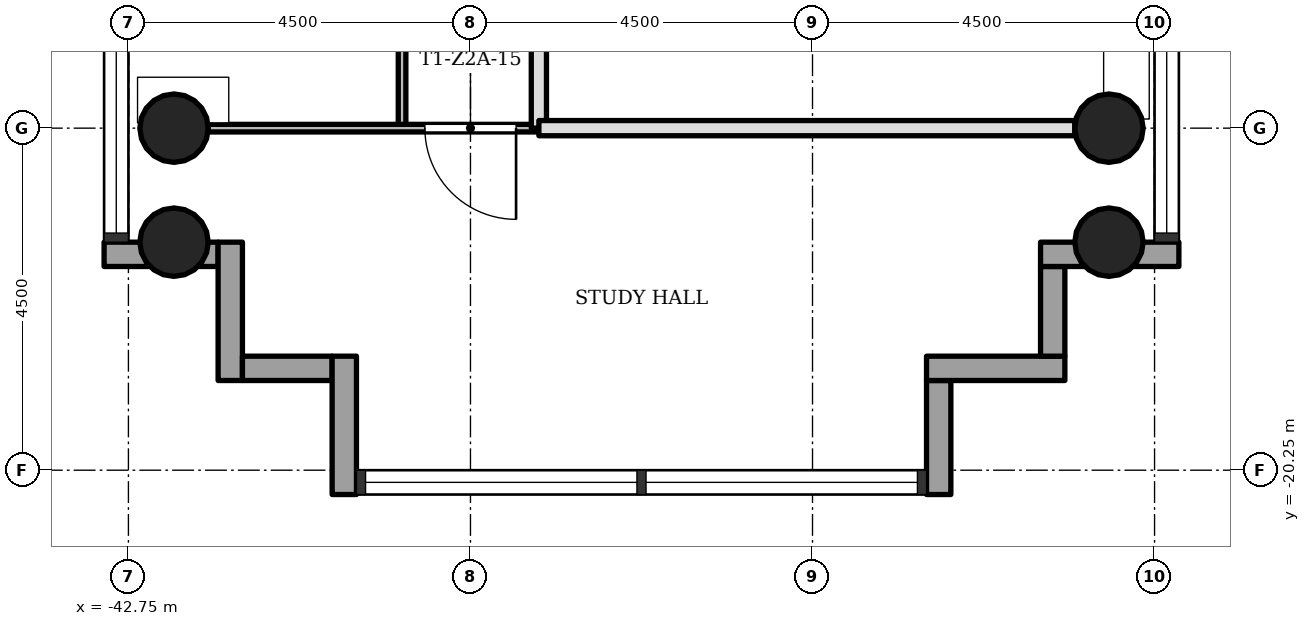
"""IFC4 building model, lengths in metres.
Left out: names, types, materials, properties, quantities, classifications, styles, units other than length and angle.
Written with IfcOpenShell. Run it as: python <this file> out.ifc"""

import sys

from ifc_helpers import new_model, si_unit, direction, frame, frame_2d, origin, origin_2d, place, context, subcontext, project, spatial, rectangle, hollow_circle, extrude, element, fill, save


model = new_model("IFC4")
c1 = context("Model", 3, precision=1e-05, world=origin(), true_north=direction((0.0, 1.0)))
c2 = subcontext(c1, "Body", "Model", "MODEL_VIEW")
j1 = project(units=[si_unit("LENGTHUNIT", "METRE"), si_unit("PLANEANGLEUNIT", "RADIAN")], contexts=[c1])
p1 = place(None, origin())
s1 = spatial("IfcSite", under=j1, at=p1, CompositionType="ELEMENT")
p2 = place(p1, origin())
s2 = spatial("IfcBuilding", under=s1, at=p2, CompositionType="ELEMENT")
p3 = place(p2, frame((0.0, 0.0, 117.4)))
s3 = spatial("IfcBuildingStorey", under=s2, at=p3, CompositionType="ELEMENT", Elevation=117.4)
for number, where, z_axis, x_axis in (
    (1, (-42.15, -15.75, 0.0), (0.0, 0.0, 1.0), (1.0, 0.0, 0.0)),
    (2, (-29.85, -15.75, 0.0), (0.0, 0.0, 1.0), (1.0, 0.0, 0.0)),
    (3, (-42.15, -17.25, 0.0), (0.0, 0.0, 1.0), (1.0, 0.0, 0.0)),
    (4, (-29.85, -17.25, 0.0), (0.0, 0.0, 1.0), (1.0, 0.0, 0.0)),
):
    element("IfcColumn", number, at=place(p3, frame(where, z_axis=z_axis, x_axis=x_axis)), inside=s3, PredefinedType="COLUMN", context=c2, shape_type="SweptSolid", body=[
        extrude(hollow_circle(Radius=0.45, WallThickness=0.032, at=origin_2d()), origin(), (0.0, 0.0, 1.0), 3.4),
    ])
p4 = place(p3, frame((-43.07, -17.41, -0.3), z_axis=(0.0, 0.0, 1.0), x_axis=(1.0, 0.0, 0.0)))
e5 = element("IfcWall", 5, at=p4, inside=s3, PredefinedType="STANDARD", context=c2, shape_type="SweptSolid", body=[
    extrude(rectangle(XDim=1.5, YDim=0.32, at=frame_2d((0.75, 0.0))), origin(), (0.0, 0.0, 1.0), 3.4),
])
p5 = place(p3, frame((-41.41, -17.25, -0.3), z_axis=(0.0, 0.0, 1.0), x_axis=(0.0, -1.0, 0.0)))
e6 = element("IfcWall", 6, at=p5, inside=s3, PredefinedType="STANDARD", context=c2, shape_type="SweptSolid", body=[
    extrude(rectangle(XDim=1.82, YDim=0.32, at=frame_2d((0.91, 0.0))), origin(), (0.0, 0.0, 1.0), 3.4),
])
p6 = place(p3, frame((-41.25, -18.91, -0.3), z_axis=(0.0, 0.0, 1.0), x_axis=(1.0, 0.0, 0.0)))
e7 = element("IfcWall", 7, at=p6, inside=s3, PredefinedType="STANDARD", context=c2, shape_type="SweptSolid", body=[
    extrude(rectangle(XDim=1.18, YDim=0.32, at=frame_2d((0.59, 0.0))), origin(), (0.0, 0.0, 1.0), 3.4),
])
p7 = place(p3, frame((-39.91, -18.75, -0.3), z_axis=(0.0, 0.0, 1.0), x_axis=(0.0, -1.0, 0.0)))
e8 = element("IfcWall", 8, at=p7, inside=s3, PredefinedType="STANDARD", context=c2, shape_type="SweptSolid", body=[
    extrude(rectangle(XDim=1.82, YDim=0.32, at=frame_2d((0.91, 0.0))), origin(), (0.0, 0.0, 1.0), 3.4),
])
p8 = place(p3, frame((-32.09, -20.57, -0.3), z_axis=(0.0, 0.0, 1.0), x_axis=(0.0, 1.0, 0.0)))
e9 = element("IfcWall", 9, at=p8, inside=s3, PredefinedType="STANDARD", context=c2, shape_type="SweptSolid", body=[
    extrude(rectangle(XDim=1.5, YDim=0.32, at=frame_2d((0.75, 0.0))), origin(), (0.0, 0.0, 1.0), 3.4),
])
p9 = place(p3, frame((-32.25, -18.91, -0.3), z_axis=(0.0, 0.0, 1.0), x_axis=(1.0, 0.0, 0.0)))
e10 = element("IfcWall", 10, at=p9, inside=s3, PredefinedType="STANDARD", context=c2, shape_type="SweptSolid", body=[
    extrude(rectangle(XDim=1.82, YDim=0.32, at=frame_2d((0.91, 0.0))), origin(), (0.0, 0.0, 1.0), 3.4),
])
p10 = place(p3, frame((-30.59, -18.75, -0.3), z_axis=(0.0, 0.0, 1.0), x_axis=(0.0, 1.0, 0.0)))
e11 = element("IfcWall", 11, at=p10, inside=s3, PredefinedType="STANDARD", context=c2, shape_type="SweptSolid", body=[
    extrude(rectangle(XDim=1.18, YDim=0.32, at=frame_2d((0.59, 0.0))), origin(), (0.0, 0.0, 1.0), 3.4),
])
p11 = place(p3, frame((-30.75, -17.41, -0.3), z_axis=(0.0, 0.0, 1.0), x_axis=(1.0, 0.0, 0.0)))
e12 = element("IfcWall", 12, at=p11, inside=s3, PredefinedType="STANDARD", context=c2, shape_type="SweptSolid", body=[
    extrude(rectangle(XDim=1.82, YDim=0.32, at=frame_2d((0.91, 0.0))), origin(), (0.0, 0.0, 1.0), 3.4),
])
p12 = place(p3, frame((-39.15, -15.75, 0.0), z_axis=(0.0, 0.0, 1.0), x_axis=(0.0, 1.0, 0.0)))
e13 = element("IfcWall", 13, at=p12, inside=s3, PredefinedType="PARTITIONING", context=c2, shape_type="SweptSolid", body=[
    extrude(rectangle(XDim=9.0, YDim=0.1, at=frame_2d((4.5, 0.0))), origin(), (0.0, 0.0, 1.0), 3.0),
])
p13 = place(p12, frame((5.55, 0.0, 0.0)))
e14 = element("IfcOpeningElement", 14, at=p13, cuts=e13, PredefinedType="OPENING", context=c2, shape_type="SweptSolid", body=[
    extrude(rectangle(XDim=0.9, YDim=2.1, at=frame_2d((0.45, 1.05))), frame((0.0, 0.06, 0.0), z_axis=(0.0, -1.0, 0.0), x_axis=(1.0, 0.0, 0.0)), (0.0, 0.0, 1.0), 0.12),
])
p14 = place(p3, frame((-37.35, -15.75, 0.0), z_axis=(0.0, 0.0, 1.0), x_axis=(0.0, 1.0, 0.0)))
e15 = element("IfcWall", 15, at=p14, inside=s3, PredefinedType="SOLIDWALL", context=c2, shape_type="SweptSolid", body=[
    extrude(rectangle(XDim=7.2, YDim=0.2, at=frame_2d((3.6, 0.0))), origin(), (0.0, 0.0, 1.0), 3.0),
])
p15 = place(p14, frame((1.95, 0.0, 0.0)))
e16 = element("IfcOpeningElement", 16, at=p15, cuts=e15, PredefinedType="OPENING", context=c2, shape_type="SweptSolid", body=[
    extrude(rectangle(XDim=0.9, YDim=2.1, at=frame_2d((0.45, 1.05))), frame((0.0, 0.11, 0.0), z_axis=(0.0, -1.0, 0.0), x_axis=(1.0, 0.0, 0.0)), (0.0, 0.0, 1.0), 0.22),
])
p16 = place(p3, frame((-41.7, -15.75, 0.0), z_axis=(0.0, 0.0, 1.0), x_axis=(1.0, 0.0, 0.0)))
e17 = element("IfcWall", 17, at=p16, inside=s3, PredefinedType="PARTITIONING", context=c2, shape_type="SweptSolid", body=[
    extrude(rectangle(XDim=4.35, YDim=0.1, at=frame_2d((2.175, 0.0))), origin(), (0.0, 0.0, 1.0), 3.0),
])
p17 = place(p16, frame((2.85, 0.0, 0.0)))
e18 = element("IfcOpeningElement", 18, at=p17, cuts=e17, PredefinedType="OPENING", context=c2, shape_type="SweptSolid", body=[
    extrude(rectangle(XDim=1.2, YDim=2.1, at=frame_2d((0.6, 1.05))), frame((0.0, 0.06, 0.0), z_axis=(0.0, -1.0, 0.0), x_axis=(1.0, 0.0, 0.0)), (0.0, 0.0, 1.0), 0.12),
])
p18 = place(p3, frame((-37.35, -15.75, 0.0), z_axis=(0.0, 0.0, 1.0), x_axis=(1.0, 0.0, 0.0)))
e19 = element("IfcWall", 19, at=p18, inside=s3, PredefinedType="SOLIDWALL", context=c2, shape_type="SweptSolid", body=[
    extrude(rectangle(XDim=7.05, YDim=0.2, at=frame_2d((3.525, 0.0))), origin(), (0.0, 0.0, 1.0), 3.0),
])
p19 = place(p17, origin())
e20 = element("IfcDoor", 20, at=p19, inside=s3, OperationType="SINGLE_SWING_RIGHT", PredefinedType="DOOR", context=c2, shape_type="SweptSolid", body=[
    extrude(rectangle(XDim=1.2, YDim=2.1, at=frame_2d((0.6, 1.05))), frame((0.0, 0.025, 0.0), z_axis=(0.0, -1.0, 0.0), x_axis=(1.0, 0.0, 0.0)), (0.0, 0.0, 1.0), 0.05),
])
fill(e18, e20)
save(model, sys.argv[1])
